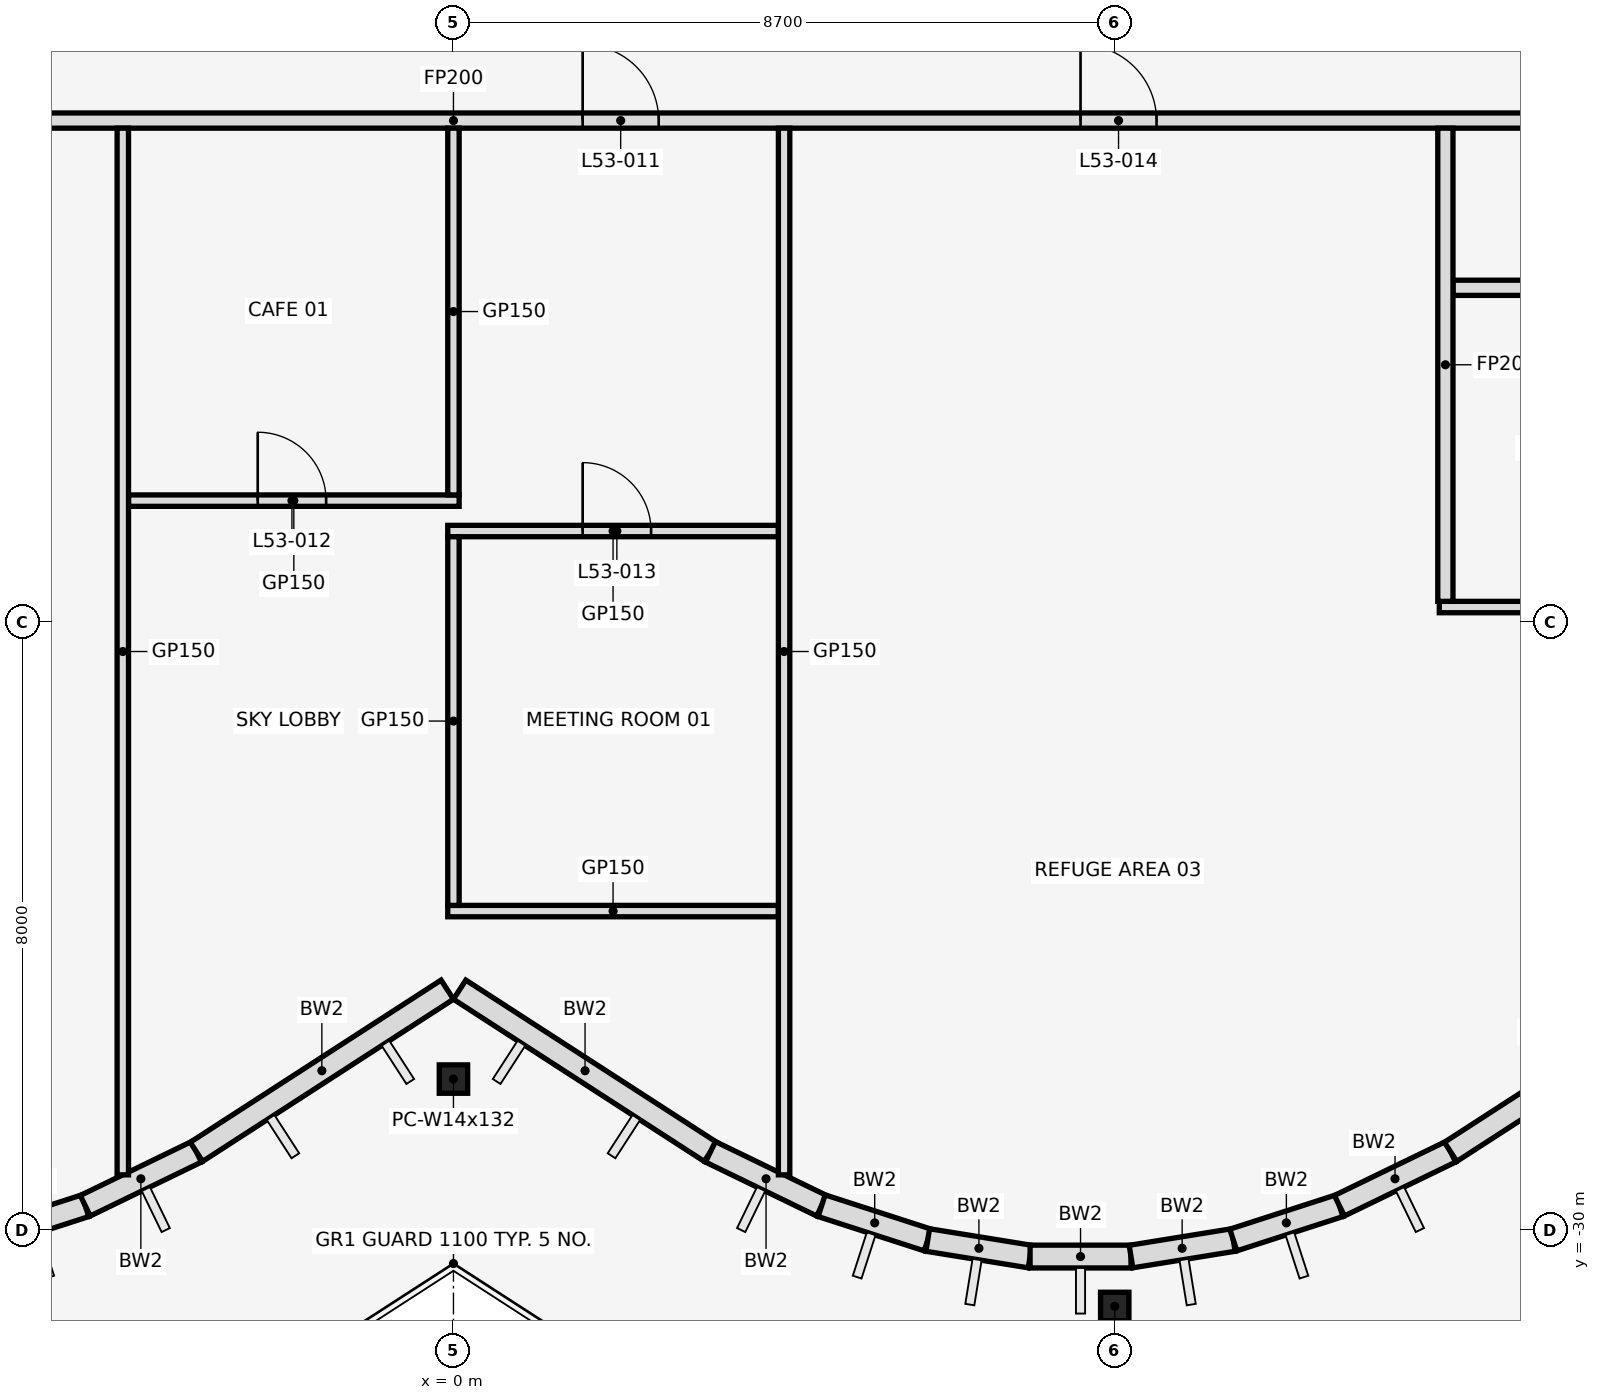
"""IFC4 building model, lengths in metres.
Left out: names, types, materials, properties, quantities, classifications, styles, units other than length and angle.
Written with IfcOpenShell. Run it as: python <this file> out.ifc"""

import sys

from ifc_helpers import new_model, si_unit, direction, frame, frame_2d, origin, origin_2d, place, context, subcontext, project, spatial, rectangle, i_section, extrude, element, fill, save


model = new_model("IFC4")
c1 = context("Model", 3, precision=1e-05, world=origin(), true_north=direction((0.0, 1.0)))
c2 = subcontext(c1, "Body", "Model", "MODEL_VIEW")
j1 = project(units=[si_unit("LENGTHUNIT", "METRE"), si_unit("PLANEANGLEUNIT", "RADIAN")], contexts=[c1])
p1 = place(None, origin())
s1 = spatial("IfcSite", under=j1, at=p1, CompositionType="ELEMENT")
p2 = place(p1, origin())
s2 = spatial("IfcBuilding", under=s1, at=p2, CompositionType="ELEMENT")
p3 = place(p2, frame((0.0, 0.0, 236.0)))
s3 = spatial("IfcBuildingStorey", under=s2, at=p3, CompositionType="ELEMENT", Elevation=236.0)
for number, where, z_axis, x_axis in (
    (1, (0.0, -28.01, 0.0), (0.0, 0.0, 1.0), (1.0, 0.0, 0.0)),
    (2, (8.7, -31.001, 0.0), (0.0, 0.0, 1.0), (1.0, 0.0, 0.0)),
):
    element("IfcColumn", number, at=place(p3, frame(where, z_axis=z_axis, x_axis=x_axis)), inside=s3, PredefinedType="COLUMN", context=c2, shape_type="SweptSolid", body=[
        extrude(i_section(OverallWidth=0.373, OverallDepth=0.373, WebThickness=0.016, FlangeThickness=0.026, at=origin_2d()), origin(), (0.0, 0.0, 1.0), 5.4),
    ])
p4 = place(p3, frame((-6.24, -30.127, 0.0), z_axis=(0.0, 0.0, 1.0), x_axis=(0.951539081691, 0.307527845919, 0.0)))
e3 = element("IfcWall", 3, at=p4, inside=s3, PredefinedType="STANDARD", context=c2, shape_type="SweptSolid", body=[
    extrude(rectangle(XDim=1.467, YDim=0.3, at=frame_2d((0.733, 0.0))), origin(), (0.0, 0.0, 1.0), 5.25),
])
p5 = place(p3, frame((-4.844, -29.676, 0.0), z_axis=(0.0, 0.0, 1.0), x_axis=(0.899798026589, 0.436306671214, 0.0)))
e4 = element("IfcWall", 4, at=p5, inside=s3, PredefinedType="STANDARD", context=c2, shape_type="SweptSolid", body=[
    extrude(rectangle(XDim=1.625, YDim=0.3, at=frame_2d((0.813, 0.0))), origin(), (0.0, 0.0, 1.0), 4.496),
])
for number, where, z_axis, x_axis in (
    (5, (-3.381, -28.967, 0.0), (0.0, 0.0, 1.0), (0.84, 0.543, 0.0)),
    (6, (0.081, -26.834, 0.0), (0.0, 0.0, 1.0), (0.84, -0.543, 0.0)),
):
    element("IfcWall", number, at=place(p3, frame(where, z_axis=z_axis, x_axis=x_axis)), inside=s3, PredefinedType="STANDARD", context=c2, shape_type="SweptSolid", body=[
        extrude(rectangle(XDim=3.929, YDim=0.3, at=frame_2d((1.965, 0.0))), origin(), (0.0, 0.0, 1.0), 4.572),
    ])
p6 = place(p3, frame((3.381, -28.967, 0.0), z_axis=(0.0, 0.0, 1.0), x_axis=(0.899798026589, -0.436306671214, 0.0)))
e7 = element("IfcWall", 7, at=p6, inside=s3, PredefinedType="STANDARD", context=c2, shape_type="SweptSolid", body=[
    extrude(rectangle(XDim=1.625, YDim=0.3, at=frame_2d((0.813, 0.0))), origin(), (0.0, 0.0, 1.0), 4.496),
])
p7 = place(p3, frame((4.844, -29.676, 0.0), z_axis=(0.0, 0.0, 1.0), x_axis=(0.951539081691, -0.307527845919, 0.0)))
e8 = element("IfcWall", 8, at=p7, inside=s3, PredefinedType="STANDARD", context=c2, shape_type="SweptSolid", body=[
    extrude(rectangle(XDim=1.467, YDim=0.3, at=frame_2d((0.733, 0.0))), origin(), (0.0, 0.0, 1.0), 5.25),
])
p8 = place(p3, frame((6.24, -30.127, 0.0), z_axis=(0.0, 0.0, 1.0), x_axis=(0.987194777017, -0.15951950423, 0.0)))
e9 = element("IfcWall", 9, at=p8, inside=s3, PredefinedType="STANDARD", context=c2, shape_type="SweptSolid", body=[
    extrude(rectangle(XDim=1.364, YDim=0.3, at=frame_2d((0.682, 0.0))), origin(), (0.0, 0.0, 1.0), 5.25),
])
p9 = place(p3, frame((7.586, -30.345, 0.0), z_axis=(0.0, 0.0, 1.0), x_axis=(1.0, 0.0, 0.0)))
e10 = element("IfcWall", 10, at=p9, inside=s3, PredefinedType="STANDARD", context=c2, shape_type="SweptSolid", body=[
    extrude(rectangle(XDim=1.328, YDim=0.3, at=frame_2d((0.664, 0.0))), origin(), (0.0, 0.0, 1.0), 4.414),
])
p10 = place(p3, frame((8.914, -30.345, 0.0), z_axis=(0.0, 0.0, 1.0), x_axis=(0.987194777017, 0.15951950423, 0.0)))
e11 = element("IfcWall", 11, at=p10, inside=s3, PredefinedType="STANDARD", context=c2, shape_type="SweptSolid", body=[
    extrude(rectangle(XDim=1.364, YDim=0.3, at=frame_2d((0.682, 0.0))), origin(), (0.0, 0.0, 1.0), 4.414),
])
p11 = place(p3, frame((10.26, -30.127, 0.0), z_axis=(0.0, 0.0, 1.0), x_axis=(0.951539081691, 0.307527845919, 0.0)))
e12 = element("IfcWall", 12, at=p11, inside=s3, PredefinedType="STANDARD", context=c2, shape_type="SweptSolid", body=[
    extrude(rectangle(XDim=1.467, YDim=0.3, at=frame_2d((0.733, 0.0))), origin(), (0.0, 0.0, 1.0), 5.25),
])
p12 = place(p3, frame((11.656, -29.676, 0.0), z_axis=(0.0, 0.0, 1.0), x_axis=(0.899798026589, 0.436306671214, 0.0)))
e13 = element("IfcWall", 13, at=p12, inside=s3, PredefinedType="STANDARD", context=c2, shape_type="SweptSolid", body=[
    extrude(rectangle(XDim=1.625, YDim=0.3, at=frame_2d((0.813, 0.0))), origin(), (0.0, 0.0, 1.0), 4.496),
])
p13 = place(p3, frame((13.119, -28.967, 0.0), z_axis=(0.0, 0.0, 1.0), x_axis=(0.839779682339, 0.542927329512, 0.0)))
e14 = element("IfcWall", 14, at=p13, inside=s3, PredefinedType="STANDARD", context=c2, shape_type="SweptSolid", body=[
    extrude(rectangle(XDim=2.875, YDim=0.3, at=frame_2d((1.438, 0.0))), origin(), (0.0, 0.0, 1.0), 4.496),
])
p14 = place(p3, frame((-0.075, -25.8, 0.0), z_axis=(0.0, 0.0, 1.0), x_axis=(1.0, 0.0, 0.0)))
e15 = element("IfcWall", 15, at=p14, inside=s3, PredefinedType="PARTITIONING", context=c2, shape_type="SweptSolid", body=[
    extrude(rectangle(XDim=4.35, YDim=0.15, at=frame_2d((2.175, 0.0))), origin(), (0.0, 0.0, 1.0), 4.318),
])
p15 = place(p3, frame((12.97, -21.8, 0.0), z_axis=(0.0, 0.0, 1.0), x_axis=(1.0, 0.0, 0.0)))
e16 = element("IfcWall", 16, at=p15, inside=s3, PredefinedType="PARTITIONING", context=c2, shape_type="SweptSolid", body=[
    extrude(rectangle(XDim=3.335, YDim=0.15, at=frame_2d((1.667, 0.0))), origin(), (0.0, 0.0, 1.0), 4.318),
])
p16 = place(p3, frame((-0.075, -20.8, 0.0), z_axis=(0.0, 0.0, 1.0), x_axis=(1.0, 0.0, 0.0)))
e17 = element("IfcWall", 17, at=p16, inside=s3, PredefinedType="PARTITIONING", context=c2, shape_type="SweptSolid", body=[
    extrude(rectangle(XDim=4.35, YDim=0.15, at=frame_2d((2.175, 0.0))), origin(), (0.0, 0.0, 1.0), 4.318),
])
p17 = place(p16, frame((1.775, 0.0, 0.0)))
e18 = element("IfcOpeningElement", 18, at=p17, cuts=e17, PredefinedType="OPENING", context=c2, shape_type="SweptSolid", body=[
    extrude(rectangle(XDim=0.9, YDim=2.1, at=frame_2d((0.45, 1.05))), frame((0.0, 0.087, 0.0), z_axis=(0.0, -1.0, 0.0), x_axis=(1.0, 0.0, 0.0)), (0.0, 0.0, 1.0), 0.174),
])
p18 = place(p3, frame((-4.275, -20.4, 0.0), z_axis=(0.0, 0.0, 1.0), x_axis=(1.0, 0.0, 0.0)))
e19 = element("IfcWall", 19, at=p18, inside=s3, PredefinedType="PARTITIONING", context=c2, shape_type="SweptSolid", body=[
    extrude(rectangle(XDim=4.35, YDim=0.15, at=frame_2d((2.175, 0.0))), origin(), (0.0, 0.0, 1.0), 4.318),
])
p19 = place(p18, frame((1.7, 0.0, 0.0)))
e20 = element("IfcOpeningElement", 20, at=p19, cuts=e19, PredefinedType="OPENING", context=c2, shape_type="SweptSolid", body=[
    extrude(rectangle(XDim=0.9, YDim=2.1, at=frame_2d((0.45, 1.05))), frame((0.0, 0.087, 0.0), z_axis=(0.0, -1.0, 0.0), x_axis=(1.0, 0.0, 0.0)), (0.0, 0.0, 1.0), 0.174),
])
p20 = place(p3, frame((13.15, -17.6, 0.0), z_axis=(0.0, 0.0, 1.0), x_axis=(1.0, 0.0, 0.0)))
e21 = element("IfcWall", 21, at=p20, inside=s3, PredefinedType="PARTITIONING", context=c2, shape_type="SweptSolid", body=[
    extrude(rectangle(XDim=8.5, YDim=0.2, at=frame_2d((4.25, 0.0))), origin(), (0.0, 0.0, 1.0), 4.318),
])
p21 = place(p20, frame((1.1, 0.0, 0.0)))
e22 = element("IfcOpeningElement", 22, at=p21, cuts=e21, PredefinedType="OPENING", context=c2, shape_type="SweptSolid", body=[
    extrude(rectangle(XDim=0.9, YDim=2.1, at=frame_2d((0.45, 1.05))), frame((0.0, 0.112, 0.0), z_axis=(0.0, -1.0, 0.0), x_axis=(1.0, 0.0, 0.0)), (0.0, 0.0, 1.0), 0.224),
])
p22 = place(p20, frame((4.3, 0.0, 0.0)))
e23 = element("IfcOpeningElement", 23, at=p22, cuts=e21, PredefinedType="OPENING", context=c2, shape_type="SweptSolid", body=[
    extrude(rectangle(XDim=0.9, YDim=2.1, at=frame_2d((0.45, 1.05))), frame((0.0, 0.112, 0.0), z_axis=(0.0, -1.0, 0.0), x_axis=(1.0, 0.0, 0.0)), (0.0, 0.0, 1.0), 0.224),
])
p23 = place(p20, frame((6.9, 0.0, 0.0)))
e24 = element("IfcOpeningElement", 24, at=p23, cuts=e21, PredefinedType="OPENING", context=c2, shape_type="SweptSolid", body=[
    extrude(rectangle(XDim=1.0, YDim=2.1, at=frame_2d((0.5, 1.05))), frame((0.0, 0.112, 0.0), z_axis=(0.0, -1.0, 0.0), x_axis=(1.0, 0.0, 0.0)), (0.0, 0.0, 1.0), 0.224),
])
p24 = place(p3, frame((-32.7, -15.4, 0.0), z_axis=(0.0, 0.0, 1.0), x_axis=(1.0, 0.0, 0.0)))
e25 = element("IfcWall", 25, at=p24, inside=s3, PredefinedType="PARTITIONING", context=c2, shape_type="SweptSolid", body=[
    extrude(rectangle(XDim=65.4, YDim=0.2, at=frame_2d((32.7, 0.0))), origin(), (0.0, 0.0, 1.0), 4.318),
])
p25 = place(p24, frame((0.7, 0.0, 0.0)))
e26 = element("IfcOpeningElement", 26, at=p25, cuts=e25, PredefinedType="OPENING", context=c2, shape_type="SweptSolid", body=[
    extrude(rectangle(XDim=0.9, YDim=2.1, at=frame_2d((0.45, 1.05))), frame((0.0, 0.112, 0.0), z_axis=(0.0, -1.0, 0.0), x_axis=(1.0, 0.0, 0.0)), (0.0, 0.0, 1.0), 0.224),
])
p26 = place(p24, frame((4.85, 0.0, 0.0)))
e27 = element("IfcOpeningElement", 27, at=p26, cuts=e25, PredefinedType="OPENING", context=c2, shape_type="SweptSolid", body=[
    extrude(rectangle(XDim=1.0, YDim=2.1, at=frame_2d((0.5, 1.05))), frame((0.0, 0.112, 0.0), z_axis=(0.0, -1.0, 0.0), x_axis=(1.0, 0.0, 0.0)), (0.0, 0.0, 1.0), 0.224),
])
p27 = place(p24, frame((14.85, 0.0, 0.0)))
e28 = element("IfcOpeningElement", 28, at=p27, cuts=e25, PredefinedType="OPENING", context=c2, shape_type="SweptSolid", body=[
    extrude(rectangle(XDim=1.0, YDim=2.1, at=frame_2d((0.5, 1.05))), frame((0.0, 0.112, 0.0), z_axis=(0.0, -1.0, 0.0), x_axis=(1.0, 0.0, 0.0)), (0.0, 0.0, 1.0), 0.224),
])
p28 = place(p24, frame((23.55, 0.0, 0.0)))
e29 = element("IfcOpeningElement", 29, at=p28, cuts=e25, PredefinedType="OPENING", context=c2, shape_type="SweptSolid", body=[
    extrude(rectangle(XDim=1.0, YDim=2.1, at=frame_2d((0.5, 1.05))), frame((0.0, 0.112, 0.0), z_axis=(0.0, -1.0, 0.0), x_axis=(1.0, 0.0, 0.0)), (0.0, 0.0, 1.0), 0.224),
])
p29 = place(p24, frame((34.4, 0.0, 0.0)))
e30 = element("IfcOpeningElement", 30, at=p29, cuts=e25, PredefinedType="OPENING", context=c2, shape_type="SweptSolid", body=[
    extrude(rectangle(XDim=1.0, YDim=2.1, at=frame_2d((0.5, 1.05))), frame((0.0, 0.112, 0.0), z_axis=(0.0, -1.0, 0.0), x_axis=(1.0, 0.0, 0.0)), (0.0, 0.0, 1.0), 0.224),
])
p30 = place(p24, frame((40.95, 0.0, 0.0)))
e31 = element("IfcOpeningElement", 31, at=p30, cuts=e25, PredefinedType="OPENING", context=c2, shape_type="SweptSolid", body=[
    extrude(rectangle(XDim=1.0, YDim=2.1, at=frame_2d((0.5, 1.05))), frame((0.0, 0.112, 0.0), z_axis=(0.0, -1.0, 0.0), x_axis=(1.0, 0.0, 0.0)), (0.0, 0.0, 1.0), 0.224),
])
p31 = place(p24, frame((49.65, 0.0, 0.0)))
e32 = element("IfcOpeningElement", 32, at=p31, cuts=e25, PredefinedType="OPENING", context=c2, shape_type="SweptSolid", body=[
    extrude(rectangle(XDim=0.9, YDim=2.1, at=frame_2d((0.45, 1.05))), frame((0.0, 0.112, 0.0), z_axis=(0.0, -1.0, 0.0), x_axis=(1.0, 0.0, 0.0)), (0.0, 0.0, 1.0), 0.224),
])
p32 = place(p24, frame((59.55, 0.0, 0.0)))
e33 = element("IfcOpeningElement", 33, at=p32, cuts=e25, PredefinedType="OPENING", context=c2, shape_type="SweptSolid", body=[
    extrude(rectangle(XDim=1.0, YDim=2.1, at=frame_2d((0.5, 1.05))), frame((0.0, 0.112, 0.0), z_axis=(0.0, -1.0, 0.0), x_axis=(1.0, 0.0, 0.0)), (0.0, 0.0, 1.0), 0.224),
])
p33 = place(p24, frame((63.85, 0.0, 0.0)))
e34 = element("IfcOpeningElement", 34, at=p33, cuts=e25, PredefinedType="OPENING", context=c2, shape_type="SweptSolid", body=[
    extrude(rectangle(XDim=0.9, YDim=2.1, at=frame_2d((0.45, 1.05))), frame((0.0, 0.112, 0.0), z_axis=(0.0, -1.0, 0.0), x_axis=(1.0, 0.0, 0.0)), (0.0, 0.0, 1.0), 0.224),
])
p34 = place(p3, frame((-4.35, -29.27, 0.0), z_axis=(0.0, 0.0, 1.0), x_axis=(0.0, 1.0, 0.0)))
e35 = element("IfcWall", 35, at=p34, inside=s3, PredefinedType="PARTITIONING", context=c2, shape_type="SweptSolid", body=[
    extrude(rectangle(XDim=13.77, YDim=0.15, at=frame_2d((6.885, 0.0))), origin(), (0.0, 0.0, 1.0), 4.318),
])
p35 = place(p3, frame((0.0, -25.725, 0.0), z_axis=(0.0, 0.0, 1.0), x_axis=(0.0, 1.0, 0.0)))
e36 = element("IfcWall", 36, at=p35, inside=s3, PredefinedType="PARTITIONING", context=c2, shape_type="SweptSolid", body=[
    extrude(rectangle(XDim=4.85, YDim=0.15, at=frame_2d((2.425, 0.0))), origin(), (0.0, 0.0, 1.0), 4.318),
])
p36 = place(p3, frame((0.0, -20.325, 0.0), z_axis=(0.0, 0.0, 1.0), x_axis=(0.0, 1.0, 0.0)))
e37 = element("IfcWall", 37, at=p36, inside=s3, PredefinedType="PARTITIONING", context=c2, shape_type="SweptSolid", body=[
    extrude(rectangle(XDim=4.825, YDim=0.15, at=frame_2d((2.413, 0.0))), origin(), (0.0, 0.0, 1.0), 4.318),
])
p37 = place(p3, frame((4.35, -29.27, 0.0), z_axis=(0.0, 0.0, 1.0), x_axis=(0.0, 1.0, 0.0)))
e38 = element("IfcWall", 38, at=p37, inside=s3, PredefinedType="PARTITIONING", context=c2, shape_type="SweptSolid", body=[
    extrude(rectangle(XDim=13.77, YDim=0.15, at=frame_2d((6.885, 0.0))), origin(), (0.0, 0.0, 1.0), 4.318),
])
p38 = place(p3, frame((13.05, -21.725, 0.0), z_axis=(0.0, 0.0, 1.0), x_axis=(0.0, 1.0, 0.0)))
e39 = element("IfcWall", 39, at=p38, inside=s3, PredefinedType="PARTITIONING", context=c2, shape_type="SweptSolid", body=[
    extrude(rectangle(XDim=6.225, YDim=0.2, at=frame_2d((3.113, 0.0))), origin(), (0.0, 0.0, 1.0), 4.318),
])
p39 = place(p29, frame((1.0, 0.0, 0.0), z_axis=(0.0, 0.0, 1.0), x_axis=(-1.0, 0.0, 0.0)))
e40 = element("IfcDoor", 40, at=p39, inside=s3, OperationType="SINGLE_SWING_RIGHT", PredefinedType="DOOR", context=c2, shape_type="SweptSolid", body=[
    extrude(rectangle(XDim=1.0, YDim=2.1, at=frame_2d((0.5, 1.05))), frame((0.0, 0.025, 0.0), z_axis=(0.0, -1.0, 0.0), x_axis=(1.0, 0.0, 0.0)), (0.0, 0.0, 1.0), 0.05),
])
fill(e30, e40)
p40 = place(p19, origin())
e41 = element("IfcDoor", 41, at=p40, inside=s3, OperationType="SINGLE_SWING_RIGHT", PredefinedType="DOOR", context=c2, shape_type="SweptSolid", body=[
    extrude(rectangle(XDim=0.9, YDim=2.1, at=frame_2d((0.45, 1.05))), frame((0.0, 0.025, 0.0), z_axis=(0.0, -1.0, 0.0), x_axis=(1.0, 0.0, 0.0)), (0.0, 0.0, 1.0), 0.05),
])
fill(e20, e41)
p41 = place(p17, frame((0.9, 0.0, 0.0), z_axis=(0.0, 0.0, 1.0), x_axis=(-1.0, 0.0, 0.0)))
e42 = element("IfcDoor", 42, at=p41, inside=s3, OperationType="SINGLE_SWING_LEFT", PredefinedType="DOOR", context=c2, shape_type="SweptSolid", body=[
    extrude(rectangle(XDim=0.9, YDim=2.1, at=frame_2d((0.45, 1.05))), frame((0.0, 0.025, 0.0), z_axis=(0.0, -1.0, 0.0), x_axis=(1.0, 0.0, 0.0)), (0.0, 0.0, 1.0), 0.05),
])
fill(e18, e42)
p42 = place(p30, frame((1.0, 0.0, 0.0), z_axis=(0.0, 0.0, 1.0), x_axis=(-1.0, 0.0, 0.0)))
e43 = element("IfcDoor", 43, at=p42, inside=s3, OperationType="SINGLE_SWING_RIGHT", PredefinedType="DOOR", context=c2, shape_type="SweptSolid", body=[
    extrude(rectangle(XDim=1.0, YDim=2.1, at=frame_2d((0.5, 1.05))), frame((0.0, 0.025, 0.0), z_axis=(0.0, -1.0, 0.0), x_axis=(1.0, 0.0, 0.0)), (0.0, 0.0, 1.0), 0.05),
])
fill(e31, e43)
save(model, sys.argv[1])
